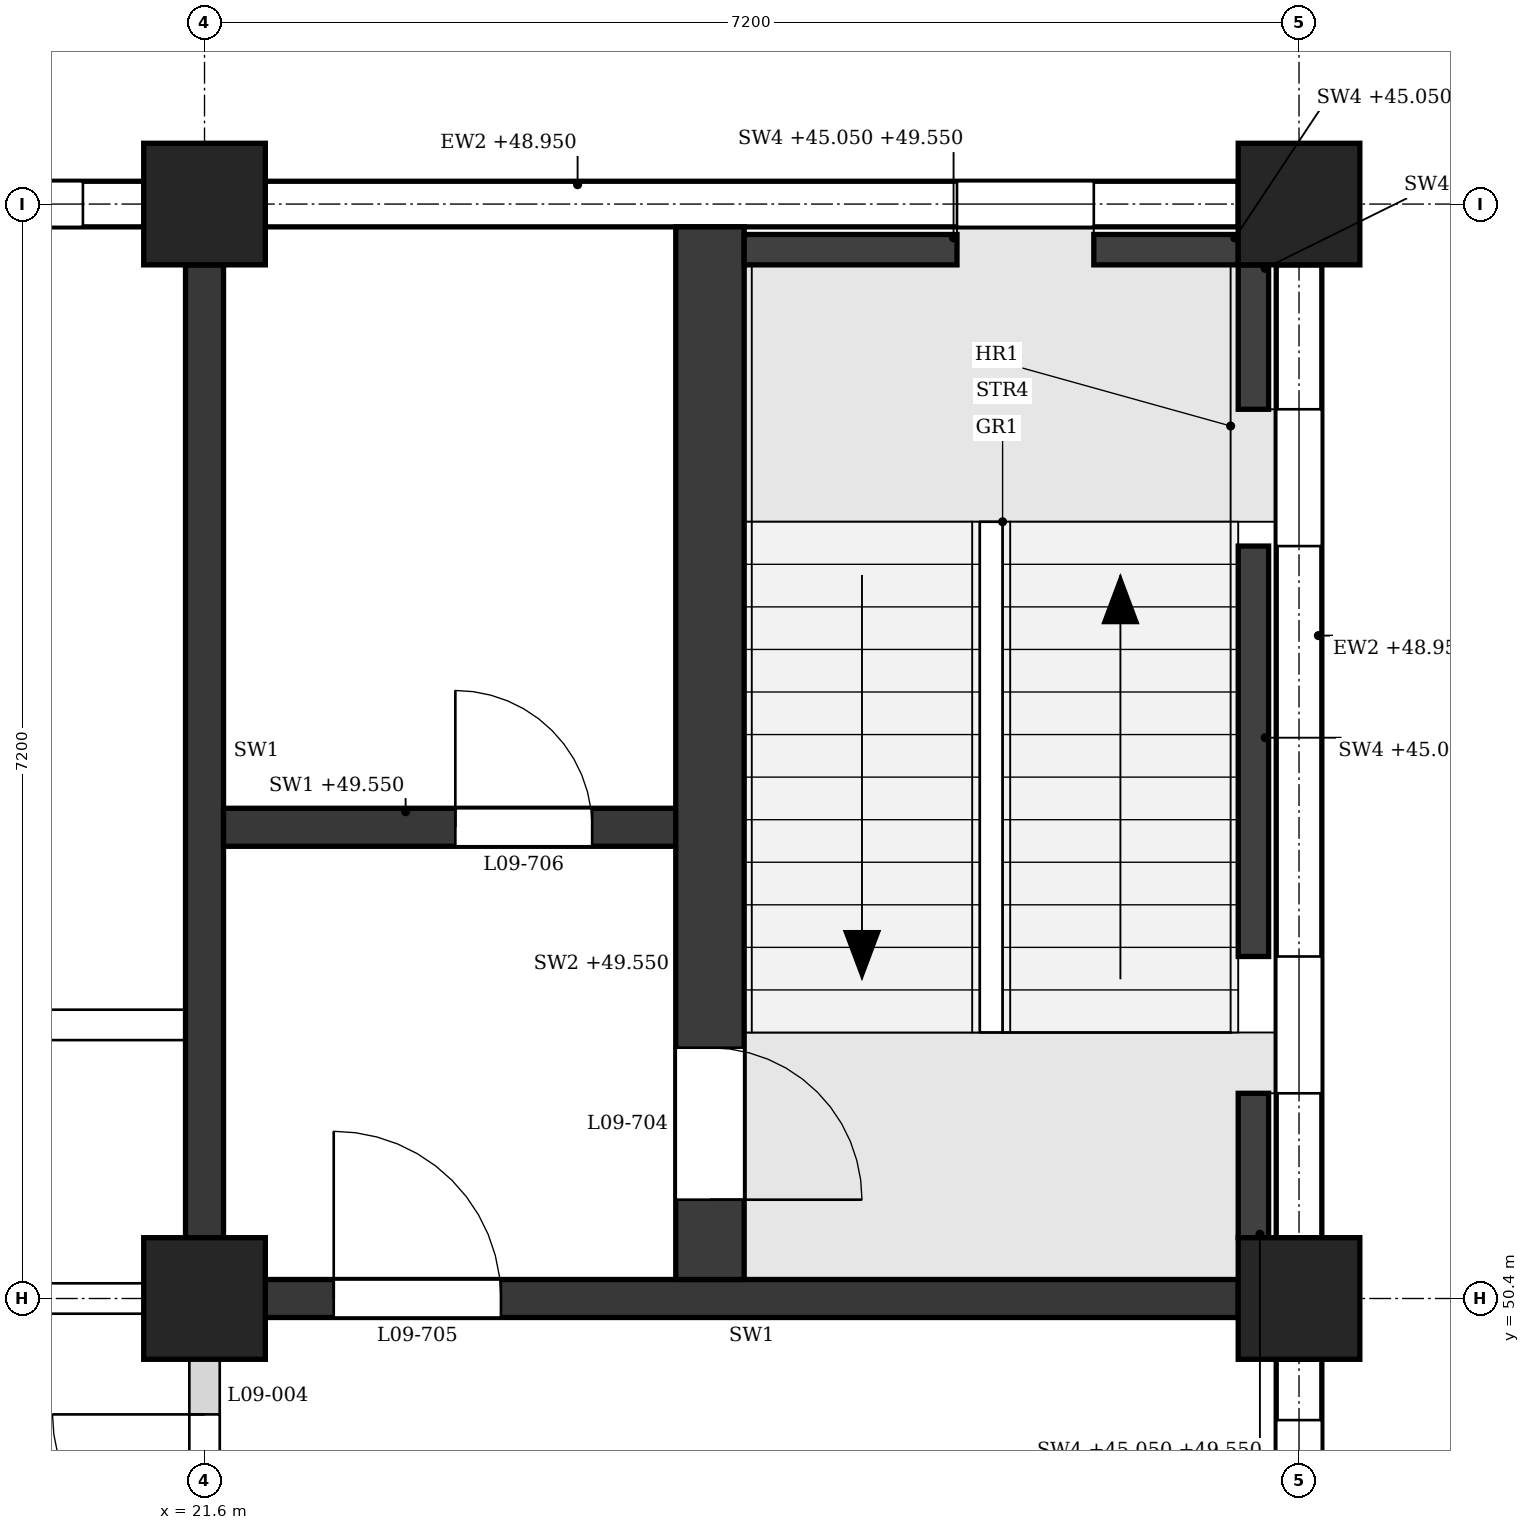
"""IFC4 building model, lengths in metres.
Left out: names, types, materials, properties, quantities, classifications, styles, units other than length and angle.
Written with IfcOpenShell. Run it as: python <this file> out.ifc"""

import sys

from ifc_helpers import new_model, si_unit, direction, frame, frame_2d, origin, origin_2d, place, context, subcontext, project, spatial, polyline, rectangle, outline, extrude, element, fill, save


model = new_model("IFC4")
c1 = context("Model", 3, precision=1e-05, world=origin(), true_north=direction((0.0, 1.0)))
c2 = subcontext(c1, "Body", "Model", "MODEL_VIEW")
j1 = project(units=[si_unit("LENGTHUNIT", "METRE"), si_unit("PLANEANGLEUNIT", "RADIAN")], contexts=[c1])
p1 = place(None, origin())
s1 = spatial("IfcSite", under=j1, at=p1, CompositionType="ELEMENT")
p2 = place(p1, origin())
s2 = spatial("IfcBuilding", under=s1, at=p2, CompositionType="ELEMENT")
p3 = place(p2, frame((0.0, 0.0, 45.3)))
s3 = spatial("IfcBuildingStorey", under=s2, at=p3, CompositionType="ELEMENT", Elevation=45.3)
for number, where, z_axis, x_axis in (
    (1, (21.6, 50.4, 0.0), (0.0, 0.0, 1.0), (1.0, 0.0, 0.0)),
    (2, (21.6, 57.6, 0.0), (0.0, 0.0, 1.0), (1.0, 0.0, 0.0)),
    (3, (28.8, 50.4, 0.0), (0.0, 0.0, 1.0), (1.0, 0.0, 0.0)),
    (4, (28.8, 57.6, 0.0), (0.0, 0.0, 1.0), (1.0, 0.0, 0.0)),
):
    element("IfcColumn", number, at=place(p3, frame(where, z_axis=z_axis, x_axis=x_axis)), inside=s3, PredefinedType="COLUMN", context=c2, shape_type="SweptSolid", body=[
        extrude(rectangle(XDim=0.8, YDim=0.8, at=origin_2d()), origin(), (0.0, 0.0, 1.0), 4.5),
    ])
p4 = place(p3, frame((28.4, 57.6, 0.0), z_axis=(0.0, 0.0, 1.0), x_axis=(-1.0, 0.0, 0.0)))
e5 = element("IfcWall", 5, at=p4, inside=s3, PredefinedType="STANDARD", context=c2, shape_type="SweptSolid", body=[
    extrude(rectangle(XDim=6.4, YDim=0.3, at=frame_2d((3.2, 0.0))), origin(), (0.0, 0.0, 1.0), 3.65),
])
p5 = place(p4, frame((0.95, 0.0, 0.9)))
e6 = element("IfcOpeningElement", 6, at=p5, cuts=e5, PredefinedType="OPENING", context=c2, shape_type="SweptSolid", body=[
    extrude(outline(polyline([(0.0, 0.0), (0.9, 0.0), (0.9, 2.25), (0.45, 2.7), (0.0, 2.25), (0.0, 0.0)])), frame((0.0, 0.16, 0.0), z_axis=(0.0, -1.0, 0.0), x_axis=(1.0, 0.0, 0.0)), (0.0, 0.0, 1.0), 0.32),
])
p6 = place(p3, frame((21.2, 57.6, 0.0), z_axis=(0.0, 0.0, 1.0), x_axis=(-1.0, 0.0, 0.0)))
e7 = element("IfcWall", 7, at=p6, inside=s3, PredefinedType="STANDARD", context=c2, shape_type="SweptSolid", body=[
    extrude(rectangle(XDim=6.4, YDim=0.3, at=frame_2d((3.2, 0.0))), origin(), (0.0, 0.0, 1.0), 3.65),
])
p7 = place(p6, frame((0.4, 0.0, 0.9)))
e8 = element("IfcOpeningElement", 8, at=p7, cuts=e7, PredefinedType="OPENING", context=c2, shape_type="SweptSolid", body=[
    extrude(outline(polyline([(0.0, 0.0), (0.85, 0.0), (0.85, 2.25), (0.425, 2.7), (0.0, 2.25), (0.0, 0.0)])), frame((0.0, 0.16, 0.0), z_axis=(0.0, -1.0, 0.0), x_axis=(1.0, 0.0, 0.0)), (0.0, 0.0, 1.0), 0.32),
])
p8 = place(p6, frame((1.55, 0.0, 0.9)))
e9 = element("IfcOpeningElement", 9, at=p8, cuts=e7, PredefinedType="OPENING", context=c2, shape_type="SweptSolid", body=[
    extrude(outline(polyline([(0.0, 0.0), (0.85, 0.0), (0.85, 2.25), (0.425, 2.7), (0.0, 2.25), (0.0, 0.0)])), frame((0.0, 0.16, 0.0), z_axis=(0.0, -1.0, 0.0), x_axis=(1.0, 0.0, 0.0)), (0.0, 0.0, 1.0), 0.32),
])
p9 = place(p6, frame((4.0, 0.0, 0.9)))
e10 = element("IfcOpeningElement", 10, at=p9, cuts=e7, PredefinedType="OPENING", context=c2, shape_type="SweptSolid", body=[
    extrude(outline(polyline([(0.0, 0.0), (0.85, 0.0), (0.85, 2.25), (0.425, 2.7), (0.0, 2.25), (0.0, 0.0)])), frame((0.0, 0.16, 0.0), z_axis=(0.0, -1.0, 0.0), x_axis=(1.0, 0.0, 0.0)), (0.0, 0.0, 1.0), 0.32),
])
p10 = place(p6, frame((5.15, 0.0, 0.9)))
e11 = element("IfcOpeningElement", 11, at=p10, cuts=e7, PredefinedType="OPENING", context=c2, shape_type="SweptSolid", body=[
    extrude(outline(polyline([(0.0, 0.0), (0.85, 0.0), (0.85, 2.25), (0.425, 2.7), (0.0, 2.25), (0.0, 0.0)])), frame((0.0, 0.16, 0.0), z_axis=(0.0, -1.0, 0.0), x_axis=(1.0, 0.0, 0.0)), (0.0, 0.0, 1.0), 0.32),
])
p11 = place(p3, frame((28.8, 43.6, 0.0), z_axis=(0.0, 0.0, 1.0), x_axis=(0.0, 1.0, 0.0)))
e12 = element("IfcWall", 12, at=p11, inside=s3, PredefinedType="STANDARD", context=c2, shape_type="SweptSolid", body=[
    extrude(rectangle(XDim=6.4, YDim=0.3, at=frame_2d((3.2, 0.0))), origin(), (0.0, 0.0, 1.0), 3.65),
])
p12 = place(p11, frame((4.0, 0.0, 0.9)))
e13 = element("IfcOpeningElement", 13, at=p12, cuts=e12, PredefinedType="OPENING", context=c2, shape_type="SweptSolid", body=[
    extrude(outline(polyline([(0.0, 0.0), (0.85, 0.0), (0.85, 2.25), (0.425, 2.7), (0.0, 2.25), (0.0, 0.0)])), frame((0.0, 0.16, 0.0), z_axis=(0.0, -1.0, 0.0), x_axis=(1.0, 0.0, 0.0)), (0.0, 0.0, 1.0), 0.32),
])
p13 = place(p11, frame((5.15, 0.0, 0.9)))
e14 = element("IfcOpeningElement", 14, at=p13, cuts=e12, PredefinedType="OPENING", context=c2, shape_type="SweptSolid", body=[
    extrude(outline(polyline([(0.0, 0.0), (0.85, 0.0), (0.85, 2.25), (0.425, 2.7), (0.0, 2.25), (0.0, 0.0)])), frame((0.0, 0.16, 0.0), z_axis=(0.0, -1.0, 0.0), x_axis=(1.0, 0.0, 0.0)), (0.0, 0.0, 1.0), 0.32),
])
p14 = place(p3, frame((28.8, 50.8, 0.0), z_axis=(0.0, 0.0, 1.0), x_axis=(0.0, 1.0, 0.0)))
e15 = element("IfcWall", 15, at=p14, inside=s3, PredefinedType="STANDARD", context=c2, shape_type="SweptSolid", body=[
    extrude(rectangle(XDim=6.4, YDim=0.3, at=frame_2d((3.2, 0.0))), origin(), (0.0, 0.0, 1.0), 3.65),
])
p15 = place(p14, frame((0.95, 0.0, 0.9)))
e16 = element("IfcOpeningElement", 16, at=p15, cuts=e15, PredefinedType="OPENING", context=c2, shape_type="SweptSolid", body=[
    extrude(outline(polyline([(0.0, 0.0), (0.9, 0.0), (0.9, 2.25), (0.45, 2.7), (0.0, 2.25), (0.0, 0.0)])), frame((0.0, 0.16, 0.0), z_axis=(0.0, -1.0, 0.0), x_axis=(1.0, 0.0, 0.0)), (0.0, 0.0, 1.0), 0.32),
])
p16 = place(p14, frame((4.55, 0.0, 0.9)))
e17 = element("IfcOpeningElement", 17, at=p16, cuts=e15, PredefinedType="OPENING", context=c2, shape_type="SweptSolid", body=[
    extrude(outline(polyline([(0.0, 0.0), (0.9, 0.0), (0.9, 2.25), (0.45, 2.7), (0.0, 2.25), (0.0, 0.0)])), frame((0.0, 0.16, 0.0), z_axis=(0.0, -1.0, 0.0), x_axis=(1.0, 0.0, 0.0)), (0.0, 0.0, 1.0), 0.32),
])
p17 = place(p3, frame((22.0, 50.4, 0.0), z_axis=(0.0, 0.0, 1.0), x_axis=(1.0, 0.0, 0.0)))
e18 = element("IfcWall", 18, at=p17, inside=s3, PredefinedType="SHEAR", context=c2, shape_type="SweptSolid", body=[
    extrude(rectangle(XDim=6.4, YDim=0.25, at=frame_2d((3.2, 0.0))), origin(), (0.0, 0.0, 1.0), 3.55),
])
p18 = place(p17, frame((0.45, 0.0, 0.0)))
e19 = element("IfcOpeningElement", 19, at=p18, cuts=e18, PredefinedType="OPENING", context=c2, shape_type="SweptSolid", body=[
    extrude(rectangle(XDim=1.1, YDim=2.1, at=frame_2d((0.55, 1.05))), frame((0.0, 0.135, 0.0), z_axis=(0.0, -1.0, 0.0), x_axis=(1.0, 0.0, 0.0)), (0.0, 0.0, 1.0), 0.27),
])
p19 = place(p3, frame((21.6, 50.8, 0.0), z_axis=(0.0, 0.0, 1.0), x_axis=(0.0, 1.0, 0.0)))
e20 = element("IfcWall", 20, at=p19, inside=s3, PredefinedType="SHEAR", context=c2, shape_type="SweptSolid", body=[
    extrude(rectangle(XDim=6.4, YDim=0.25, at=frame_2d((3.2, 0.0))), origin(), (0.0, 0.0, 1.0), 3.55),
])
p20 = place(p3, frame((28.5, 50.8, -0.25), z_axis=(0.0, 0.0, 1.0), x_axis=(0.0, 1.0, 0.0)))
e21 = element("IfcWall", 21, at=p20, inside=s3, PredefinedType="SHEAR", context=c2, shape_type="SweptSolid", body=[
    extrude(rectangle(XDim=0.95, YDim=0.2, at=frame_2d((0.475, 0.0))), origin(), (0.0, 0.0, 1.0), 4.5),
])
p21 = place(p3, frame((28.5, 52.65, -0.25), z_axis=(0.0, 0.0, 1.0), x_axis=(0.0, 1.0, 0.0)))
e22 = element("IfcWall", 22, at=p21, inside=s3, PredefinedType="SHEAR", context=c2, shape_type="SweptSolid", body=[
    extrude(rectangle(XDim=2.7, YDim=0.2, at=frame_2d((1.35, 0.0))), origin(), (0.0, 0.0, 1.0), 4.5),
])
p22 = place(p3, frame((28.5, 56.25, -0.25), z_axis=(0.0, 0.0, 1.0), x_axis=(0.0, 1.0, 0.0)))
e23 = element("IfcWall", 23, at=p22, inside=s3, PredefinedType="SHEAR", context=c2, shape_type="SweptSolid", body=[
    extrude(rectangle(XDim=0.95, YDim=0.2, at=frame_2d((0.475, 0.0))), origin(), (0.0, 0.0, 1.0), 4.5),
])
p23 = place(p3, frame((25.15, 57.3, -0.25), z_axis=(0.0, 0.0, 1.0), x_axis=(1.0, 0.0, 0.0)))
e24 = element("IfcWall", 24, at=p23, inside=s3, PredefinedType="SHEAR", context=c2, shape_type="SweptSolid", body=[
    extrude(rectangle(XDim=1.4, YDim=0.2, at=frame_2d((0.7, 0.0))), origin(), (0.0, 0.0, 1.0), 4.5),
])
p24 = place(p3, frame((27.45, 57.3, -0.25), z_axis=(0.0, 0.0, 1.0), x_axis=(1.0, 0.0, 0.0)))
e25 = element("IfcWall", 25, at=p24, inside=s3, PredefinedType="SHEAR", context=c2, shape_type="SweptSolid", body=[
    extrude(rectangle(XDim=0.95, YDim=0.2, at=frame_2d((0.475, 0.0))), origin(), (0.0, 0.0, 1.0), 4.5),
])
p25 = place(p3, frame((24.925, 50.525, 0.0), z_axis=(0.0, 0.0, 1.0), x_axis=(0.0, 1.0, 0.0)))
e26 = element("IfcWall", 26, at=p25, inside=s3, PredefinedType="SHEAR", context=c2, shape_type="SweptSolid", body=[
    extrude(rectangle(XDim=6.925, YDim=0.45, at=frame_2d((3.462, 0.0))), origin(), (0.0, 0.0, 1.0), 4.25),
])
p26 = place(p25, frame((0.525, 0.0, 0.0)))
e27 = element("IfcOpeningElement", 27, at=p26, cuts=e26, PredefinedType="OPENING", context=c2, shape_type="SweptSolid", body=[
    extrude(rectangle(XDim=1.0, YDim=2.1, at=frame_2d((0.5, 1.05))), frame((0.0, 0.235, 0.0), z_axis=(0.0, -1.0, 0.0), x_axis=(1.0, 0.0, 0.0)), (0.0, 0.0, 1.0), 0.47),
])
p27 = place(p3, frame((21.725, 53.5, 0.0), z_axis=(0.0, 0.0, 1.0), x_axis=(1.0, 0.0, 0.0)))
e28 = element("IfcWall", 28, at=p27, inside=s3, PredefinedType="SHEAR", context=c2, shape_type="SweptSolid", body=[
    extrude(rectangle(XDim=2.975, YDim=0.25, at=frame_2d((1.487, 0.0))), origin(), (0.0, 0.0, 1.0), 4.25),
])
p28 = place(p27, frame((1.525, 0.0, 0.0)))
e29 = element("IfcOpeningElement", 29, at=p28, cuts=e28, PredefinedType="OPENING", context=c2, shape_type="SweptSolid", body=[
    extrude(rectangle(XDim=0.9, YDim=2.1, at=frame_2d((0.45, 1.05))), frame((0.0, 0.135, 0.0), z_axis=(0.0, -1.0, 0.0), x_axis=(1.0, 0.0, 0.0)), (0.0, 0.0, 1.0), 0.27),
])
p29 = place(p3, frame((14.8, 50.4, 0.0), z_axis=(0.0, 0.0, 1.0), x_axis=(1.0, 0.0, 0.0)))
e30 = element("IfcWall", 30, at=p29, inside=s3, PredefinedType="PARTITIONING", context=c2, shape_type="SweptSolid", body=[
    extrude(rectangle(XDim=6.4, YDim=0.2, at=frame_2d((3.2, 0.0))), origin(), (0.0, 0.0, 1.0), 3.55),
])
p30 = place(p29, frame((4.3, 0.0, 0.0)))
e31 = element("IfcOpeningElement", 31, at=p30, cuts=e30, PredefinedType="OPENING", context=c2, shape_type="SweptSolid", body=[
    extrude(rectangle(XDim=1.0, YDim=2.1, at=frame_2d((0.5, 1.05))), frame((0.0, 0.11, 0.0), z_axis=(0.0, -1.0, 0.0), x_axis=(1.0, 0.0, 0.0)), (0.0, 0.0, 1.0), 0.22),
])
p31 = place(p3, frame((7.325, 52.2, 0.0), z_axis=(0.0, 0.0, 1.0), x_axis=(1.0, 0.0, 0.0)))
e32 = element("IfcWall", 32, at=p31, inside=s3, PredefinedType="PARTITIONING", context=c2, shape_type="SweptSolid", body=[
    extrude(outline(polyline([(0.0, 0.0), (14.15, 0.0), (14.15, 3.55), (14.05, 3.55), (14.05, 4.25), (7.3, 4.25), (7.3, 3.55), (6.85, 3.55), (6.85, 4.25), (0.1, 4.25), (0.1, 3.55), (0.0, 3.55), (0.0, 0.0)])), frame((0.0, 0.1, 0.0), z_axis=(0.0, -1.0, 0.0), x_axis=(1.0, 0.0, 0.0)), (0.0, 0.0, 1.0), 0.2),
])
p32 = place(p31, frame((1.238, 0.0, 0.0)))
e33 = element("IfcOpeningElement", 33, at=p32, cuts=e32, PredefinedType="OPENING", context=c2, shape_type="SweptSolid", body=[
    extrude(rectangle(XDim=1.0, YDim=2.1, at=frame_2d((0.5, 1.05))), frame((0.0, 0.11, 0.0), z_axis=(0.0, -1.0, 0.0), x_axis=(1.0, 0.0, 0.0)), (0.0, 0.0, 1.0), 0.22),
])
p33 = place(p31, frame((4.775, 0.0, 0.0)))
e34 = element("IfcOpeningElement", 34, at=p33, cuts=e32, PredefinedType="OPENING", context=c2, shape_type="SweptSolid", body=[
    extrude(rectangle(XDim=1.0, YDim=2.1, at=frame_2d((0.5, 1.05))), frame((0.0, 0.11, 0.0), z_axis=(0.0, -1.0, 0.0), x_axis=(1.0, 0.0, 0.0)), (0.0, 0.0, 1.0), 0.22),
])
p34 = place(p31, frame((8.375, 0.0, 0.0)))
e35 = element("IfcOpeningElement", 35, at=p34, cuts=e32, PredefinedType="OPENING", context=c2, shape_type="SweptSolid", body=[
    extrude(rectangle(XDim=1.0, YDim=2.1, at=frame_2d((0.5, 1.05))), frame((0.0, 0.11, 0.0), z_axis=(0.0, -1.0, 0.0), x_axis=(1.0, 0.0, 0.0)), (0.0, 0.0, 1.0), 0.22),
])
p35 = place(p31, frame((11.913, 0.0, 0.0)))
e36 = element("IfcOpeningElement", 36, at=p35, cuts=e32, PredefinedType="OPENING", context=c2, shape_type="SweptSolid", body=[
    extrude(rectangle(XDim=1.0, YDim=2.1, at=frame_2d((0.5, 1.05))), frame((0.0, 0.11, 0.0), z_axis=(0.0, -1.0, 0.0), x_axis=(1.0, 0.0, 0.0)), (0.0, 0.0, 1.0), 0.22),
])
p36 = place(p3, frame((21.6, 47.275, 0.0), z_axis=(0.0, 0.0, 1.0), x_axis=(0.0, 1.0, 0.0)))
e37 = element("IfcWall", 37, at=p36, inside=s3, PredefinedType="PARTITIONING", context=c2, shape_type="SweptSolid", body=[
    extrude(rectangle(XDim=2.725, YDim=0.2, at=frame_2d((1.363, 0.0))), origin(), (0.0, 0.0, 1.0), 3.55),
])
p37 = place(p36, frame((0.363, 0.0, 0.0)))
e38 = element("IfcOpeningElement", 38, at=p37, cuts=e37, PredefinedType="OPENING", context=c2, shape_type="SweptSolid", body=[
    extrude(rectangle(XDim=2.0, YDim=2.4, at=frame_2d((1.0, 1.2))), frame((0.0, 0.11, 0.0), z_axis=(0.0, -1.0, 0.0), x_axis=(1.0, 0.0, 0.0)), (0.0, 0.0, 1.0), 0.22),
])
p38 = place(p13, origin())
e39 = element("IfcWindow", 39, at=p38, inside=s3, PartitioningType="SINGLE_PANEL", PredefinedType="WINDOW", context=c2, shape_type="SweptSolid", body=[
    extrude(outline(polyline([(0.0, 0.0), (0.85, 0.0), (0.85, 2.25), (0.425, 2.7), (0.0, 2.25), (0.0, 0.0)])), frame((0.0, 0.03, 0.0), z_axis=(0.0, -1.0, 0.0), x_axis=(1.0, 0.0, 0.0)), (0.0, 0.0, 1.0), 0.06),
])
fill(e14, e39)
p39 = place(p15, origin())
e40 = element("IfcWindow", 40, at=p39, inside=s3, PartitioningType="SINGLE_PANEL", PredefinedType="WINDOW", context=c2, shape_type="SweptSolid", body=[
    extrude(outline(polyline([(0.0, 0.0), (0.9, 0.0), (0.9, 2.25), (0.45, 2.7), (0.0, 2.25), (0.0, 0.0)])), frame((0.0, 0.03, 0.0), z_axis=(0.0, -1.0, 0.0), x_axis=(1.0, 0.0, 0.0)), (0.0, 0.0, 1.0), 0.06),
])
fill(e16, e40)
p40 = place(p16, origin())
e41 = element("IfcWindow", 41, at=p40, inside=s3, PartitioningType="SINGLE_PANEL", PredefinedType="WINDOW", context=c2, shape_type="SweptSolid", body=[
    extrude(outline(polyline([(0.0, 0.0), (0.9, 0.0), (0.9, 2.25), (0.45, 2.7), (0.0, 2.25), (0.0, 0.0)])), frame((0.0, 0.03, 0.0), z_axis=(0.0, -1.0, 0.0), x_axis=(1.0, 0.0, 0.0)), (0.0, 0.0, 1.0), 0.06),
])
fill(e17, e41)
p41 = place(p5, origin())
e42 = element("IfcWindow", 42, at=p41, inside=s3, PartitioningType="SINGLE_PANEL", PredefinedType="WINDOW", context=c2, shape_type="SweptSolid", body=[
    extrude(outline(polyline([(0.0, 0.0), (0.9, 0.0), (0.9, 2.25), (0.45, 2.7), (0.0, 2.25), (0.0, 0.0)])), frame((0.0, 0.03, 0.0), z_axis=(0.0, -1.0, 0.0), x_axis=(1.0, 0.0, 0.0)), (0.0, 0.0, 1.0), 0.06),
])
fill(e6, e42)
p42 = place(p7, origin())
e43 = element("IfcWindow", 43, at=p42, inside=s3, PartitioningType="SINGLE_PANEL", PredefinedType="WINDOW", context=c2, shape_type="SweptSolid", body=[
    extrude(outline(polyline([(0.0, 0.0), (0.85, 0.0), (0.85, 2.25), (0.425, 2.7), (0.0, 2.25), (0.0, 0.0)])), frame((0.0, 0.03, 0.0), z_axis=(0.0, -1.0, 0.0), x_axis=(1.0, 0.0, 0.0)), (0.0, 0.0, 1.0), 0.06),
])
fill(e8, e43)
p43 = place(p26, frame((1.0, 0.0, 0.0), z_axis=(0.0, 0.0, 1.0), x_axis=(-1.0, 0.0, 0.0)))
e44 = element("IfcDoor", 44, at=p43, inside=s3, OperationType="SINGLE_SWING_RIGHT", PredefinedType="DOOR", context=c2, shape_type="SweptSolid", body=[
    extrude(rectangle(XDim=1.0, YDim=2.1, at=frame_2d((0.5, 1.05))), frame((0.0, 0.025, 0.0), z_axis=(0.0, -1.0, 0.0), x_axis=(1.0, 0.0, 0.0)), (0.0, 0.0, 1.0), 0.05),
])
fill(e27, e44)
p44 = place(p18, origin())
e45 = element("IfcDoor", 45, at=p44, inside=s3, OperationType="SINGLE_SWING_LEFT", PredefinedType="DOOR", context=c2, shape_type="SweptSolid", body=[
    extrude(rectangle(XDim=1.1, YDim=2.1, at=frame_2d((0.55, 1.05))), frame((0.0, 0.025, 0.0), z_axis=(0.0, -1.0, 0.0), x_axis=(1.0, 0.0, 0.0)), (0.0, 0.0, 1.0), 0.05),
])
fill(e19, e45)
p45 = place(p28, origin())
e46 = element("IfcDoor", 46, at=p45, inside=s3, OperationType="SINGLE_SWING_LEFT", PredefinedType="DOOR", context=c2, shape_type="SweptSolid", body=[
    extrude(rectangle(XDim=0.9, YDim=2.1, at=frame_2d((0.45, 1.05))), frame((0.0, 0.025, 0.0), z_axis=(0.0, -1.0, 0.0), x_axis=(1.0, 0.0, 0.0)), (0.0, 0.0, 1.0), 0.05),
])
fill(e29, e46)
p46 = place(p37, origin())
e47 = element("IfcDoor", 47, at=p46, inside=s3, OperationType="DOUBLE_DOOR_SINGLE_SWING", PredefinedType="DOOR", context=c2, shape_type="SweptSolid", body=[
    extrude(rectangle(XDim=2.0, YDim=2.4, at=frame_2d((1.0, 1.2))), frame((0.0, 0.025, 0.0), z_axis=(0.0, -1.0, 0.0), x_axis=(1.0, 0.0, 0.0)), (0.0, 0.0, 1.0), 0.05),
])
fill(e38, e47)
save(model, sys.argv[1])
